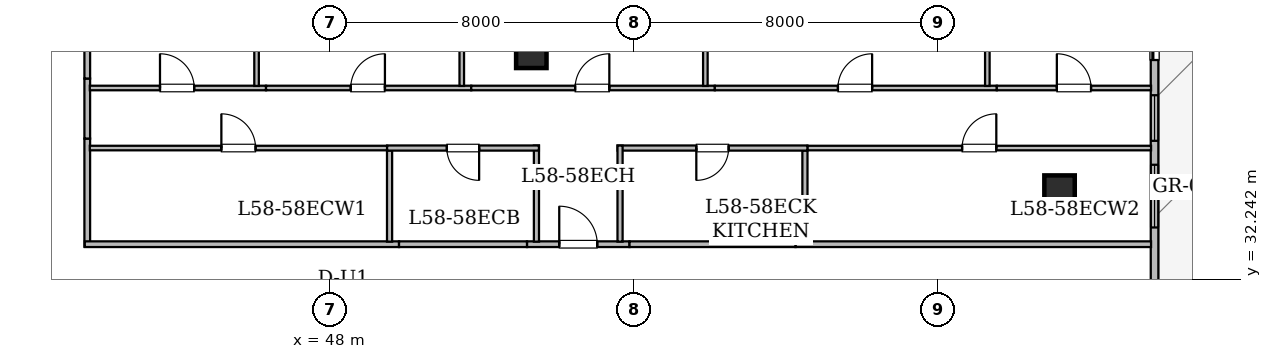
"""IFC4 building model, lengths in metres.
Left out: names, types, materials, properties, quantities, classifications, styles, units other than length and angle.
Written with IfcOpenShell. Run it as: python <this file> out.ifc"""

import sys

from ifc_helpers import new_model, si_unit, direction, frame, frame_2d, origin, origin_2d, place, context, subcontext, project, spatial, rectangle, hollow_rectangle, extrude, element, fill, save


model = new_model("IFC4")
c1 = context("Model", 3, precision=1e-05, world=origin(), true_north=direction((0.0, 1.0)))
c2 = subcontext(c1, "Body", "Model", "MODEL_VIEW")
j1 = project(units=[si_unit("LENGTHUNIT", "METRE"), si_unit("PLANEANGLEUNIT", "RADIAN")], contexts=[c1])
p1 = place(None, origin())
s1 = spatial("IfcSite", under=j1, at=p1, CompositionType="ELEMENT")
p2 = place(p1, origin())
s2 = spatial("IfcBuilding", under=s1, at=p2, CompositionType="ELEMENT")
p3 = place(p2, frame((0.0, 0.0, 228.15)))
s3 = spatial("IfcBuildingStorey", under=s2, at=p3, CompositionType="ELEMENT", Elevation=228.15)
for number, where, z_axis, x_axis in (
    (1, (67.2, 34.575, 0.0), (0.0, 0.0, 1.0), (1.0, 0.0, 0.0)),
    (2, (53.3, 38.2, 0.0), (0.0, 0.0, 1.0), (1.0, 0.0, 0.0)),
):
    element("IfcColumn", number, at=place(p3, frame(where, z_axis=z_axis, x_axis=x_axis)), inside=s3, PredefinedType="COLUMN", context=c2, shape_type="SweptSolid", body=[
        extrude(hollow_rectangle(XDim=0.8, YDim=0.8, WallThickness=0.04, at=origin_2d()), origin(), (0.0, 0.0, 1.0), 3.65),
    ])
p4 = place(p3, frame((69.7, 39.896, 0.0), z_axis=(0.0, 0.0, 1.0), x_axis=(0.0, -1.0, 0.0)))
e3 = element("IfcWall", 3, at=p4, inside=s3, PredefinedType="STANDARD", context=c2, shape_type="SweptSolid", body=[
    extrude(rectangle(XDim=8.863, YDim=0.2, at=frame_2d((4.432, 0.0))), origin(), (0.0, 0.0, 1.0), 3.43),
])
p5 = place(p4, frame((0.785, 0.0, 0.0)))
e4 = element("IfcOpeningElement", 4, at=p5, cuts=e3, PredefinedType="OPENING", context=c2, shape_type="SweptSolid", body=[
    extrude(rectangle(XDim=1.1, YDim=2.2, at=frame_2d((0.55, 1.1))), frame((0.0, 0.11, 0.0), z_axis=(0.0, -1.0, 0.0), x_axis=(1.0, 0.0, 0.0)), (0.0, 0.0, 1.0), 0.22),
])
p6 = place(p4, frame((4.641, 0.0, 0.85)))
e5 = element("IfcOpeningElement", 5, at=p6, cuts=e3, PredefinedType="OPENING", context=c2, shape_type="SweptSolid", body=[
    extrude(rectangle(XDim=1.65, YDim=1.55, at=frame_2d((0.825, 0.775))), frame((0.0, 0.11, 0.0), z_axis=(0.0, -1.0, 0.0), x_axis=(1.0, 0.0, 0.0)), (0.0, 0.0, 1.0), 0.22),
])
p7 = place(p4, frame((2.811, 0.0, 0.8)))
e6 = element("IfcOpeningElement", 6, at=p7, cuts=e3, PredefinedType="OPENING", context=c2, shape_type="SweptSolid", body=[
    extrude(rectangle(XDim=1.2, YDim=1.5, at=frame_2d((0.6, 0.75))), frame((0.0, 0.11, 0.0), z_axis=(0.0, -1.0, 0.0), x_axis=(1.0, 0.0, 0.0)), (0.0, 0.0, 1.0), 0.22),
])
p8 = place(p3, frame((41.615, 35.944, 0.0), z_axis=(0.0, 0.0, 1.0), x_axis=(0.0, -1.0, 0.0)))
e7 = element("IfcWall", 7, at=p8, inside=s3, PredefinedType="STANDARD", context=c2, shape_type="SweptSolid", body=[
    extrude(rectangle(XDim=2.844, YDim=0.15, at=frame_2d((1.422, 0.0))), origin(), (0.0, 0.0, 1.0), 3.065),
])
p9 = place(p3, frame((41.55, 33.165, 0.0), z_axis=(0.0, 0.0, 1.0), x_axis=(1.0, 0.0, 0.0)))
e8 = element("IfcWall", 8, at=p9, inside=s3, PredefinedType="STANDARD", context=c2, shape_type="SweptSolid", body=[
    extrude(rectangle(XDim=8.269, YDim=0.15, at=frame_2d((4.135, 0.0))), origin(), (0.0, 0.0, 1.0), 3.065),
])
p10 = place(p3, frame((60.251, 33.165, 0.0), z_axis=(0.0, 0.0, 1.0), x_axis=(1.0, 0.0, 0.0)))
e9 = element("IfcWall", 9, at=p10, inside=s3, PredefinedType="STANDARD", context=c2, shape_type="SweptSolid", body=[
    extrude(rectangle(XDim=9.357, YDim=0.15, at=frame_2d((4.678, 0.0))), origin(), (0.0, 0.0, 1.0), 2.887),
])
p11 = place(p3, frame((41.615, 37.524, 0.0), z_axis=(0.0, 0.0, 1.0), x_axis=(0.0, -1.0, 0.0)))
e10 = element("IfcWall", 10, at=p11, inside=s3, PredefinedType="STANDARD", context=c2, shape_type="SweptSolid", body=[
    extrude(rectangle(XDim=1.58, YDim=0.15, at=frame_2d((0.79, 0.0))), origin(), (0.0, 0.0, 1.0), 2.725),
])
p12 = place(p3, frame((53.186, 33.165, 0.0), z_axis=(0.0, 0.0, 1.0), x_axis=(1.0, 0.0, 0.0)))
e11 = element("IfcWall", 11, at=p12, inside=s3, PredefinedType="STANDARD", context=c2, shape_type="SweptSolid", body=[
    extrude(rectangle(XDim=2.698, YDim=0.15, at=frame_2d((1.349, 0.0))), origin(), (0.0, 0.0, 1.0), 2.725),
])
p13 = place(p12, frame((0.849, 0.0, 0.0)))
e12 = element("IfcOpeningElement", 12, at=p13, cuts=e11, PredefinedType="OPENING", context=c2, shape_type="SweptSolid", body=[
    extrude(rectangle(XDim=1.0, YDim=2.15, at=frame_2d((0.5, 1.075))), frame((0.0, 0.085, 0.0), z_axis=(0.0, -1.0, 0.0), x_axis=(1.0, 0.0, 0.0)), (0.0, 0.0, 1.0), 0.17),
])
p14 = place(p3, frame((49.819, 33.165, 0.0), z_axis=(0.0, 0.0, 1.0), x_axis=(1.0, 0.0, 0.0)))
e13 = element("IfcWall", 13, at=p14, inside=s3, PredefinedType="STANDARD", context=c2, shape_type="SweptSolid", body=[
    extrude(rectangle(XDim=3.367, YDim=0.15, at=frame_2d((1.684, 0.0))), origin(), (0.0, 0.0, 1.0), 2.725),
])
p15 = place(p3, frame((55.884, 33.165, 0.0), z_axis=(0.0, 0.0, 1.0), x_axis=(1.0, 0.0, 0.0)))
e14 = element("IfcWall", 14, at=p15, inside=s3, PredefinedType="STANDARD", context=c2, shape_type="SweptSolid", body=[
    extrude(rectangle(XDim=4.367, YDim=0.15, at=frame_2d((2.184, 0.0))), origin(), (0.0, 0.0, 1.0), 3.065),
])
p16 = place(p3, frame((41.615, 39.1, 0.0), z_axis=(0.0, 0.0, 1.0), x_axis=(0.0, -1.0, 0.0)))
e15 = element("IfcWall", 15, at=p16, inside=s3, PredefinedType="STANDARD", context=c2, shape_type="SweptSolid", body=[
    extrude(rectangle(XDim=1.576, YDim=0.15, at=frame_2d((0.788, 0.0))), origin(), (0.0, 0.0, 1.0), 2.725),
])
p17 = place(p3, frame((41.682, 35.695, 0.0), z_axis=(0.0, 0.0, 1.0), x_axis=(1.0, 0.0, 0.0)))
e16 = element("IfcWall", 16, at=p17, inside=s3, PredefinedType="PARTITIONING", context=c2, shape_type="SweptSolid", body=[
    extrude(rectangle(XDim=7.823, YDim=0.12, at=frame_2d((3.912, 0.0))), origin(), (0.0, 0.0, 1.0), 3.43),
])
p18 = place(p17, frame((3.462, 0.0, 0.0)))
e17 = element("IfcOpeningElement", 17, at=p18, cuts=e16, PredefinedType="OPENING", context=c2, shape_type="SweptSolid", body=[
    extrude(rectangle(XDim=0.9, YDim=2.1, at=frame_2d((0.45, 1.05))), frame((0.0, 0.07, 0.0), z_axis=(0.0, -1.0, 0.0), x_axis=(1.0, 0.0, 0.0)), (0.0, 0.0, 1.0), 0.14),
])
p19 = place(p3, frame((49.57, 35.63, 0.0), z_axis=(0.0, 0.0, 1.0), x_axis=(0.0, -1.0, 0.0)))
e18 = element("IfcWall", 18, at=p19, inside=s3, PredefinedType="PARTITIONING", context=c2, shape_type="SweptSolid", body=[
    extrude(rectangle(XDim=2.398, YDim=0.135, at=frame_2d((1.199, 0.0))), origin(), (0.0, 0.0, 1.0), 3.065),
])
p20 = place(p3, frame((60.565, 35.695, 0.0), z_axis=(0.0, 0.0, 1.0), x_axis=(1.0, 0.0, 0.0)))
e19 = element("IfcWall", 19, at=p20, inside=s3, PredefinedType="PARTITIONING", context=c2, shape_type="SweptSolid", body=[
    extrude(rectangle(XDim=9.043, YDim=0.12, at=frame_2d((4.521, 0.0))), origin(), (0.0, 0.0, 1.0), 2.725),
])
p21 = place(p20, frame((4.071, 0.0, 0.0)))
e20 = element("IfcOpeningElement", 20, at=p21, cuts=e19, PredefinedType="OPENING", context=c2, shape_type="SweptSolid", body=[
    extrude(rectangle(XDim=0.9, YDim=2.1, at=frame_2d((0.45, 1.05))), frame((0.0, 0.07, 0.0), z_axis=(0.0, -1.0, 0.0), x_axis=(1.0, 0.0, 0.0)), (0.0, 0.0, 1.0), 0.14),
])
p22 = place(p3, frame((60.5, 33.232, 0.0), z_axis=(0.0, 0.0, 1.0), x_axis=(0.0, 1.0, 0.0)))
e21 = element("IfcWall", 21, at=p22, inside=s3, PredefinedType="PARTITIONING", context=c2, shape_type="SweptSolid", body=[
    extrude(rectangle(XDim=2.398, YDim=0.135, at=frame_2d((1.199, 0.0))), origin(), (0.0, 0.0, 1.0), 3.065),
])
p23 = place(p3, frame((53.435, 33.232, 0.0), z_axis=(0.0, 0.0, 1.0), x_axis=(0.0, 1.0, 0.0)))
e22 = element("IfcWall", 22, at=p23, inside=s3, PredefinedType="PARTITIONING", context=c2, shape_type="SweptSolid", body=[
    extrude(rectangle(XDim=2.528, YDim=0.135, at=frame_2d((1.264, 0.0))), origin(), (0.0, 0.0, 1.0), 2.725),
])
p24 = place(p3, frame((53.5, 35.695, 0.0), z_axis=(0.0, 0.0, 1.0), x_axis=(-1.0, 0.0, 0.0)))
e23 = element("IfcWall", 23, at=p24, inside=s3, PredefinedType="PARTITIONING", context=c2, shape_type="SweptSolid", body=[
    extrude(rectangle(XDim=3.995, YDim=0.135, at=frame_2d((1.998, 0.0))), origin(), (0.0, 0.0, 1.0), 2.725),
])
p25 = place(p24, frame((1.573, 0.0, 0.0)))
e24 = element("IfcOpeningElement", 24, at=p25, cuts=e23, PredefinedType="OPENING", context=c2, shape_type="SweptSolid", body=[
    extrude(rectangle(XDim=0.85, YDim=2.1, at=frame_2d((0.425, 1.05))), frame((0.0, 0.077, 0.0), z_axis=(0.0, -1.0, 0.0), x_axis=(1.0, 0.0, 0.0)), (0.0, 0.0, 1.0), 0.155),
])
p26 = place(p3, frame((60.565, 35.695, 0.0), z_axis=(0.0, 0.0, 1.0), x_axis=(-1.0, 0.0, 0.0)))
e25 = element("IfcWall", 25, at=p26, inside=s3, PredefinedType="PARTITIONING", context=c2, shape_type="SweptSolid", body=[
    extrude(rectangle(XDim=4.995, YDim=0.135, at=frame_2d((2.498, 0.0))), origin(), (0.0, 0.0, 1.0), 3.43),
])
p27 = place(p26, frame((2.073, 0.0, 0.0)))
e26 = element("IfcOpeningElement", 26, at=p27, cuts=e25, PredefinedType="OPENING", context=c2, shape_type="SweptSolid", body=[
    extrude(rectangle(XDim=0.85, YDim=2.1, at=frame_2d((0.425, 1.05))), frame((0.0, 0.077, 0.0), z_axis=(0.0, -1.0, 0.0), x_axis=(1.0, 0.0, 0.0)), (0.0, 0.0, 1.0), 0.155),
])
p28 = place(p3, frame((55.635, 35.76, 0.0), z_axis=(0.0, 0.0, 1.0), x_axis=(0.0, -1.0, 0.0)))
e27 = element("IfcWall", 27, at=p28, inside=s3, PredefinedType="PARTITIONING", context=c2, shape_type="SweptSolid", body=[
    extrude(rectangle(XDim=2.528, YDim=0.135, at=frame_2d((1.264, 0.0))), origin(), (0.0, 0.0, 1.0), 3.065),
])
p29 = place(p3, frame((41.682, 37.275, 0.0), z_axis=(0.0, 0.0, 1.0), x_axis=(1.0, 0.0, 0.0)))
e28 = element("IfcWall", 28, at=p29, inside=s3, PredefinedType="PARTITIONING", context=c2, shape_type="SweptSolid", body=[
    extrude(rectangle(XDim=4.637, YDim=0.12, at=frame_2d((2.319, 0.0))), origin(), (0.0, 0.0, 1.0), 2.725),
])
p30 = place(p29, frame((1.847, 0.0, 0.0)))
e29 = element("IfcOpeningElement", 29, at=p30, cuts=e28, PredefinedType="OPENING", context=c2, shape_type="SweptSolid", body=[
    extrude(rectangle(XDim=0.9, YDim=2.1, at=frame_2d((0.45, 1.05))), frame((0.0, 0.07, 0.0), z_axis=(0.0, -1.0, 0.0), x_axis=(1.0, 0.0, 0.0)), (0.0, 0.0, 1.0), 0.14),
])
p31 = place(p3, frame((46.319, 37.275, 0.0), z_axis=(0.0, 0.0, 1.0), x_axis=(1.0, 0.0, 0.0)))
e30 = element("IfcWall", 30, at=p31, inside=s3, PredefinedType="PARTITIONING", context=c2, shape_type="SweptSolid", body=[
    extrude(rectangle(XDim=5.4, YDim=0.12, at=frame_2d((2.7, 0.0))), origin(), (0.0, 0.0, 1.0), 2.725),
])
p32 = place(p31, frame((2.229, 0.0, 0.0)))
e31 = element("IfcOpeningElement", 31, at=p32, cuts=e30, PredefinedType="OPENING", context=c2, shape_type="SweptSolid", body=[
    extrude(rectangle(XDim=0.9, YDim=2.1, at=frame_2d((0.45, 1.05))), frame((0.0, 0.07, 0.0), z_axis=(0.0, -1.0, 0.0), x_axis=(1.0, 0.0, 0.0)), (0.0, 0.0, 1.0), 0.14),
])
p33 = place(p3, frame((51.719, 37.275, 0.0), z_axis=(0.0, 0.0, 1.0), x_axis=(1.0, 0.0, 0.0)))
e32 = element("IfcWall", 32, at=p33, inside=s3, PredefinedType="PARTITIONING", context=c2, shape_type="SweptSolid", body=[
    extrude(rectangle(XDim=6.41, YDim=0.12, at=frame_2d((3.205, 0.0))), origin(), (0.0, 0.0, 1.0), 2.725),
])
p34 = place(p33, frame((2.734, 0.0, 0.0)))
e33 = element("IfcOpeningElement", 33, at=p34, cuts=e32, PredefinedType="OPENING", context=c2, shape_type="SweptSolid", body=[
    extrude(rectangle(XDim=0.9, YDim=2.1, at=frame_2d((0.45, 1.05))), frame((0.0, 0.07, 0.0), z_axis=(0.0, -1.0, 0.0), x_axis=(1.0, 0.0, 0.0)), (0.0, 0.0, 1.0), 0.14),
])
p35 = place(p3, frame((58.129, 37.275, 0.0), z_axis=(0.0, 0.0, 1.0), x_axis=(1.0, 0.0, 0.0)))
e34 = element("IfcWall", 34, at=p35, inside=s3, PredefinedType="PARTITIONING", context=c2, shape_type="SweptSolid", body=[
    extrude(rectangle(XDim=7.42, YDim=0.12, at=frame_2d((3.71, 0.0))), origin(), (0.0, 0.0, 1.0), 2.725),
])
p36 = place(p35, frame((3.239, 0.0, 0.0)))
e35 = element("IfcOpeningElement", 35, at=p36, cuts=e34, PredefinedType="OPENING", context=c2, shape_type="SweptSolid", body=[
    extrude(rectangle(XDim=0.9, YDim=2.1, at=frame_2d((0.45, 1.05))), frame((0.0, 0.07, 0.0), z_axis=(0.0, -1.0, 0.0), x_axis=(1.0, 0.0, 0.0)), (0.0, 0.0, 1.0), 0.14),
])
p37 = place(p3, frame((65.549, 37.275, 0.0), z_axis=(0.0, 0.0, 1.0), x_axis=(1.0, 0.0, 0.0)))
e36 = element("IfcWall", 36, at=p37, inside=s3, PredefinedType="PARTITIONING", context=c2, shape_type="SweptSolid", body=[
    extrude(rectangle(XDim=4.059, YDim=0.12, at=frame_2d((2.029, 0.0))), origin(), (0.0, 0.0, 1.0), 2.887),
])
p38 = place(p37, frame((1.58, 0.0, 0.0)))
e37 = element("IfcOpeningElement", 37, at=p38, cuts=e36, PredefinedType="OPENING", context=c2, shape_type="SweptSolid", body=[
    extrude(rectangle(XDim=0.9, YDim=2.1, at=frame_2d((0.45, 1.05))), frame((0.0, 0.07, 0.0), z_axis=(0.0, -1.0, 0.0), x_axis=(1.0, 0.0, 0.0)), (0.0, 0.0, 1.0), 0.14),
])
for number, where, z_axis, x_axis in (
    (38, (46.07, 43.808, 0.0), (0.0, 0.0, 1.0), (0.0, -1.0, 0.0)),
    (39, (51.47, 43.808, 0.0), (0.0, 0.0, 1.0), (0.0, -1.0, 0.0)),
    (40, (57.88, 43.808, 0.0), (0.0, 0.0, 1.0), (0.0, -1.0, 0.0)),
):
    element("IfcWall", number, at=place(p3, frame(where, z_axis=z_axis, x_axis=x_axis)), inside=s3, PredefinedType="PARTITIONING", context=c2, shape_type="SweptSolid", body=[
        extrude(rectangle(XDim=6.479, YDim=0.12, at=frame_2d((3.24, 0.0))), origin(), (0.0, 0.0, 1.0), 2.725),
    ])
p39 = place(p3, frame((65.3, 43.808, 0.0), z_axis=(0.0, 0.0, 1.0), x_axis=(0.0, -1.0, 0.0)))
e41 = element("IfcWall", 41, at=p39, inside=s3, PredefinedType="PARTITIONING", context=c2, shape_type="SweptSolid", body=[
    extrude(rectangle(XDim=6.479, YDim=0.12, at=frame_2d((3.24, 0.0))), origin(), (0.0, 0.0, 1.0), 2.887),
])
p40 = place(p5, origin())
e42 = element("IfcDoor", 42, at=p40, inside=s3, OperationType="SLIDING_TO_LEFT", PredefinedType="DOOR", context=c2, shape_type="SweptSolid", body=[
    extrude(rectangle(XDim=1.1, YDim=2.2, at=frame_2d((0.55, 1.1))), frame((0.0, 0.025, 0.0), z_axis=(0.0, -1.0, 0.0), x_axis=(1.0, 0.0, 0.0)), (0.0, 0.0, 1.0), 0.05),
])
fill(e4, e42)
p41 = place(p6, origin())
e43 = element("IfcWindow", 43, at=p41, inside=s3, PartitioningType="SINGLE_PANEL", PredefinedType="WINDOW", context=c2, shape_type="SweptSolid", body=[
    extrude(rectangle(XDim=1.65, YDim=1.55, at=frame_2d((0.825, 0.775))), frame((0.0, 0.03, 0.0), z_axis=(0.0, -1.0, 0.0), x_axis=(1.0, 0.0, 0.0)), (0.0, 0.0, 1.0), 0.06),
])
fill(e5, e43)
p42 = place(p7, origin())
e44 = element("IfcWindow", 44, at=p42, inside=s3, PartitioningType="SINGLE_PANEL", PredefinedType="WINDOW", context=c2, shape_type="SweptSolid", body=[
    extrude(rectangle(XDim=1.2, YDim=1.5, at=frame_2d((0.6, 0.75))), frame((0.0, 0.03, 0.0), z_axis=(0.0, -1.0, 0.0), x_axis=(1.0, 0.0, 0.0)), (0.0, 0.0, 1.0), 0.06),
])
fill(e6, e44)
p43 = place(p13, origin())
e45 = element("IfcDoor", 45, at=p43, inside=s3, OperationType="SINGLE_SWING_LEFT", PredefinedType="DOOR", context=c2, shape_type="SweptSolid", body=[
    extrude(rectangle(XDim=1.0, YDim=2.15, at=frame_2d((0.5, 1.075))), frame((0.0, 0.025, 0.0), z_axis=(0.0, -1.0, 0.0), x_axis=(1.0, 0.0, 0.0)), (0.0, 0.0, 1.0), 0.05),
])
fill(e12, e45)
p44 = place(p18, origin())
e46 = element("IfcDoor", 46, at=p44, inside=s3, OperationType="SINGLE_SWING_LEFT", PredefinedType="DOOR", context=c2, shape_type="SweptSolid", body=[
    extrude(rectangle(XDim=0.9, YDim=2.1, at=frame_2d((0.45, 1.05))), frame((0.0, 0.025, 0.0), z_axis=(0.0, -1.0, 0.0), x_axis=(1.0, 0.0, 0.0)), (0.0, 0.0, 1.0), 0.05),
])
fill(e17, e46)
p45 = place(p21, origin())
e47 = element("IfcDoor", 47, at=p45, inside=s3, OperationType="SINGLE_SWING_RIGHT", PredefinedType="DOOR", context=c2, shape_type="SweptSolid", body=[
    extrude(rectangle(XDim=0.9, YDim=2.1, at=frame_2d((0.45, 1.05))), frame((0.0, 0.025, 0.0), z_axis=(0.0, -1.0, 0.0), x_axis=(1.0, 0.0, 0.0)), (0.0, 0.0, 1.0), 0.05),
])
fill(e20, e47)
p46 = place(p25, origin())
e48 = element("IfcDoor", 48, at=p46, inside=s3, OperationType="SINGLE_SWING_LEFT", PredefinedType="DOOR", context=c2, shape_type="SweptSolid", body=[
    extrude(rectangle(XDim=0.85, YDim=2.1, at=frame_2d((0.425, 1.05))), frame((0.0, 0.025, 0.0), z_axis=(0.0, -1.0, 0.0), x_axis=(1.0, 0.0, 0.0)), (0.0, 0.0, 1.0), 0.05),
])
fill(e24, e48)
p47 = place(p27, origin())
e49 = element("IfcDoor", 49, at=p47, inside=s3, OperationType="SINGLE_SWING_RIGHT", PredefinedType="DOOR", context=c2, shape_type="SweptSolid", body=[
    extrude(rectangle(XDim=0.85, YDim=2.1, at=frame_2d((0.425, 1.05))), frame((0.0, 0.025, 0.0), z_axis=(0.0, -1.0, 0.0), x_axis=(1.0, 0.0, 0.0)), (0.0, 0.0, 1.0), 0.05),
])
fill(e26, e49)
p48 = place(p30, origin())
e50 = element("IfcDoor", 50, at=p48, inside=s3, OperationType="SINGLE_SWING_LEFT", PredefinedType="DOOR", context=c2, shape_type="SweptSolid", body=[
    extrude(rectangle(XDim=0.9, YDim=2.1, at=frame_2d((0.45, 1.05))), frame((0.0, 0.025, 0.0), z_axis=(0.0, -1.0, 0.0), x_axis=(1.0, 0.0, 0.0)), (0.0, 0.0, 1.0), 0.05),
])
fill(e29, e50)
p49 = place(p32, origin())
e51 = element("IfcDoor", 51, at=p49, inside=s3, OperationType="SINGLE_SWING_RIGHT", PredefinedType="DOOR", context=c2, shape_type="SweptSolid", body=[
    extrude(rectangle(XDim=0.9, YDim=2.1, at=frame_2d((0.45, 1.05))), frame((0.0, 0.025, 0.0), z_axis=(0.0, -1.0, 0.0), x_axis=(1.0, 0.0, 0.0)), (0.0, 0.0, 1.0), 0.05),
])
fill(e31, e51)
p50 = place(p34, origin())
e52 = element("IfcDoor", 52, at=p50, inside=s3, OperationType="SINGLE_SWING_RIGHT", PredefinedType="DOOR", context=c2, shape_type="SweptSolid", body=[
    extrude(rectangle(XDim=0.9, YDim=2.1, at=frame_2d((0.45, 1.05))), frame((0.0, 0.025, 0.0), z_axis=(0.0, -1.0, 0.0), x_axis=(1.0, 0.0, 0.0)), (0.0, 0.0, 1.0), 0.05),
])
fill(e33, e52)
p51 = place(p36, origin())
e53 = element("IfcDoor", 53, at=p51, inside=s3, OperationType="SINGLE_SWING_RIGHT", PredefinedType="DOOR", context=c2, shape_type="SweptSolid", body=[
    extrude(rectangle(XDim=0.9, YDim=2.1, at=frame_2d((0.45, 1.05))), frame((0.0, 0.025, 0.0), z_axis=(0.0, -1.0, 0.0), x_axis=(1.0, 0.0, 0.0)), (0.0, 0.0, 1.0), 0.05),
])
fill(e35, e53)
p52 = place(p38, origin())
e54 = element("IfcDoor", 54, at=p52, inside=s3, OperationType="SINGLE_SWING_LEFT", PredefinedType="DOOR", context=c2, shape_type="SweptSolid", body=[
    extrude(rectangle(XDim=0.9, YDim=2.1, at=frame_2d((0.45, 1.05))), frame((0.0, 0.025, 0.0), z_axis=(0.0, -1.0, 0.0), x_axis=(1.0, 0.0, 0.0)), (0.0, 0.0, 1.0), 0.05),
])
fill(e37, e54)
save(model, sys.argv[1])
